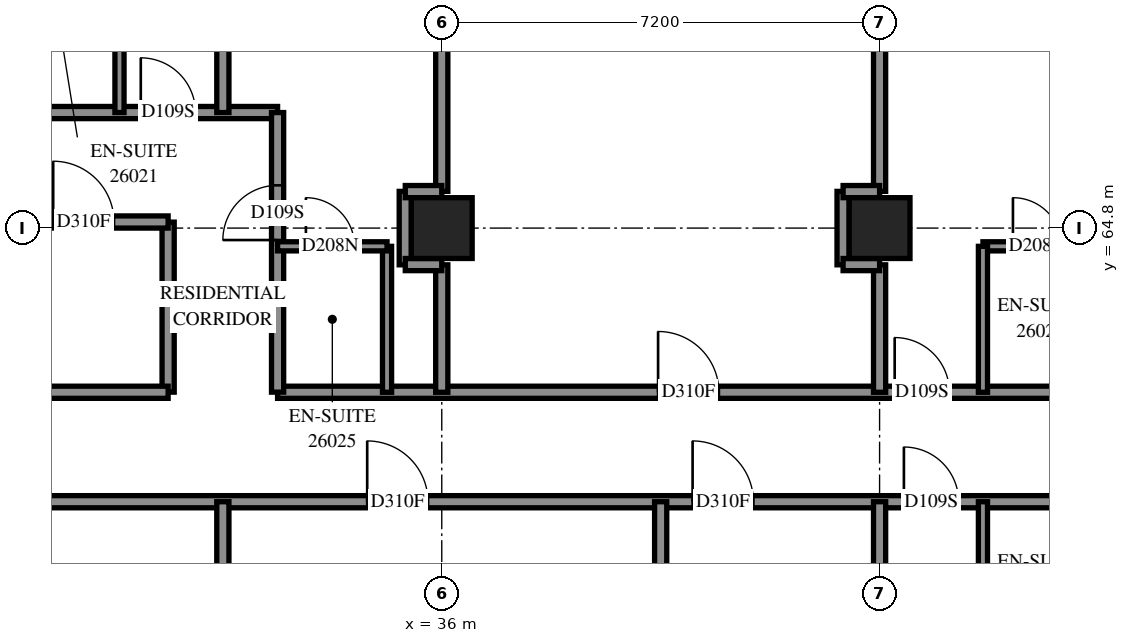
"""IFC4 building model, lengths in metres.
Left out: names, types, materials, properties, quantities, classifications, styles, units other than length and angle.
Written with IfcOpenShell. Run it as: python <this file> out.ifc"""

import sys

from ifc_helpers import new_model, si_unit, direction, frame, frame_2d, origin, origin_2d, place, context, subcontext, project, spatial, rectangle, extrude, element, fill, save


model = new_model("IFC4")
c1 = context("Model", 3, precision=1e-05, world=origin(), true_north=direction((0.0, 1.0)))
c2 = subcontext(c1, "Body", "Model", "MODEL_VIEW")
j1 = project(units=[si_unit("LENGTHUNIT", "METRE"), si_unit("PLANEANGLEUNIT", "RADIAN")], contexts=[c1])
p1 = place(None, origin())
s1 = spatial("IfcSite", under=j1, at=p1, CompositionType="ELEMENT")
p2 = place(p1, origin())
s2 = spatial("IfcBuilding", under=s1, at=p2, CompositionType="ELEMENT")
p3 = place(p2, frame((0.0, 0.0, 98.2)))
s3 = spatial("IfcBuildingStorey", under=s2, at=p3, CompositionType="ELEMENT", Elevation=98.2)
for number, where, z_axis, x_axis in (
    (1, (36.0, 64.8, 0.0), (0.0, 0.0, 1.0), (1.0, 0.0, 0.0)),
    (2, (43.2, 64.8, 0.0), (0.0, 0.0, 1.0), (1.0, 0.0, 0.0)),
):
    element("IfcColumn", number, at=place(p3, frame(where, z_axis=z_axis, x_axis=x_axis)), inside=s3, PredefinedType="COLUMN", context=c2, shape_type="SweptSolid", body=[
        extrude(rectangle(XDim=1.0, YDim=1.0, at=origin_2d()), origin(), (0.0, 0.0, 1.0), 3.1),
    ])
p4 = place(p3, frame((28.802, 60.3, 0.0), z_axis=(0.0, 0.0, 1.0), x_axis=(1.0, 0.0, 0.0)))
e3 = element("IfcWall", 3, at=p4, inside=s3, PredefinedType="PARTITIONING", context=c2, shape_type="SweptSolid", body=[
    extrude(rectangle(XDim=24.298, YDim=0.2, at=frame_2d((12.149, 0.0))), origin(), (0.0, 0.0, 1.0), 3.1),
])
p5 = place(p4, frame((5.972, 0.0, 0.0)))
e4 = element("IfcOpeningElement", 4, at=p5, cuts=e3, PredefinedType="OPENING", context=c2, shape_type="SweptSolid", body=[
    extrude(rectangle(XDim=1.0, YDim=2.1, at=frame_2d((0.5, 1.05))), frame((0.0, 0.11, 0.0), z_axis=(0.0, -1.0, 0.0), x_axis=(1.0, 0.0, 0.0)), (0.0, 0.0, 1.0), 0.22),
])
p6 = place(p4, frame((11.323, 0.0, 0.0)))
e5 = element("IfcOpeningElement", 5, at=p6, cuts=e3, PredefinedType="OPENING", context=c2, shape_type="SweptSolid", body=[
    extrude(rectangle(XDim=1.0, YDim=2.1, at=frame_2d((0.5, 1.05))), frame((0.0, 0.11, 0.0), z_axis=(0.0, -1.0, 0.0), x_axis=(1.0, 0.0, 0.0)), (0.0, 0.0, 1.0), 0.22),
])
p7 = place(p4, frame((14.798, 0.0, 0.0)))
e6 = element("IfcOpeningElement", 6, at=p7, cuts=e3, PredefinedType="OPENING", context=c2, shape_type="SweptSolid", body=[
    extrude(rectangle(XDim=0.9, YDim=2.1, at=frame_2d((0.45, 1.05))), frame((0.0, 0.11, 0.0), z_axis=(0.0, -1.0, 0.0), x_axis=(1.0, 0.0, 0.0)), (0.0, 0.0, 1.0), 0.22),
])
p8 = place(p4, frame((18.833, 0.0, 0.0)))
e7 = element("IfcOpeningElement", 7, at=p8, cuts=e3, PredefinedType="OPENING", context=c2, shape_type="SweptSolid", body=[
    extrude(rectangle(XDim=1.0, YDim=2.1, at=frame_2d((0.5, 1.05))), frame((0.0, 0.11, 0.0), z_axis=(0.0, -1.0, 0.0), x_axis=(1.0, 0.0, 0.0)), (0.0, 0.0, 1.0), 0.22),
])
p9 = place(p4, frame((23.151, 0.0, 0.0)))
e8 = element("IfcOpeningElement", 8, at=p9, cuts=e3, PredefinedType="OPENING", context=c2, shape_type="SweptSolid", body=[
    extrude(rectangle(XDim=1.0, YDim=2.1, at=frame_2d((0.5, 1.05))), frame((0.0, 0.11, 0.0), z_axis=(0.0, -1.0, 0.0), x_axis=(1.0, 0.0, 0.0)), (0.0, 0.0, 1.0), 0.22),
])
p10 = place(p3, frame((33.3, 62.1, 0.0), z_axis=(0.0, 0.0, 1.0), x_axis=(1.0, 0.0, 0.0)))
e9 = element("IfcWall", 9, at=p10, inside=s3, PredefinedType="PARTITIONING", context=c2, shape_type="SweptSolid", body=[
    extrude(rectangle(XDim=17.1, YDim=0.2, at=frame_2d((8.55, 0.0))), origin(), (0.0, 0.0, 1.0), 3.1),
])
p11 = place(p10, frame((6.258, 0.0, 0.0)))
e10 = element("IfcOpeningElement", 10, at=p11, cuts=e9, PredefinedType="OPENING", context=c2, shape_type="SweptSolid", body=[
    extrude(rectangle(XDim=1.0, YDim=2.1, at=frame_2d((0.5, 1.05))), frame((0.0, 0.11, 0.0), z_axis=(0.0, -1.0, 0.0), x_axis=(1.0, 0.0, 0.0)), (0.0, 0.0, 1.0), 0.22),
])
p12 = place(p10, frame((10.148, 0.0, 0.0)))
e11 = element("IfcOpeningElement", 11, at=p12, cuts=e9, PredefinedType="OPENING", context=c2, shape_type="SweptSolid", body=[
    extrude(rectangle(XDim=0.9, YDim=2.1, at=frame_2d((0.45, 1.05))), frame((0.0, 0.11, 0.0), z_axis=(0.0, -1.0, 0.0), x_axis=(1.0, 0.0, 0.0)), (0.0, 0.0, 1.0), 0.22),
])
p13 = place(p10, frame((15.729, 0.0, 0.0)))
e12 = element("IfcOpeningElement", 12, at=p13, cuts=e9, PredefinedType="OPENING", context=c2, shape_type="SweptSolid", body=[
    extrude(rectangle(XDim=0.9, YDim=2.1, at=frame_2d((0.45, 1.05))), frame((0.0, 0.11, 0.0), z_axis=(0.0, -1.0, 0.0), x_axis=(1.0, 0.0, 0.0)), (0.0, 0.0, 1.0), 0.22),
])
p14 = place(p3, frame((21.602, 66.7, 0.0), z_axis=(0.0, 0.0, 1.0), x_axis=(1.0, 0.0, 0.0)))
e13 = element("IfcWall", 13, at=p14, inside=s3, PredefinedType="PARTITIONING", context=c2, shape_type="SweptSolid", body=[
    extrude(rectangle(XDim=11.698, YDim=0.2, at=frame_2d((5.849, 0.0))), origin(), (0.0, 0.0, 1.0), 3.1),
])
p15 = place(p14, frame((1.79, 0.0, 0.0)))
e14 = element("IfcOpeningElement", 14, at=p15, cuts=e13, PredefinedType="OPENING", context=c2, shape_type="SweptSolid", body=[
    extrude(rectangle(XDim=1.0, YDim=2.1, at=frame_2d((0.5, 1.05))), frame((0.0, 0.11, 0.0), z_axis=(0.0, -1.0, 0.0), x_axis=(1.0, 0.0, 0.0)), (0.0, 0.0, 1.0), 0.22),
])
p16 = place(p14, frame((3.998, 0.0, 0.0)))
e15 = element("IfcOpeningElement", 15, at=p16, cuts=e13, PredefinedType="OPENING", context=c2, shape_type="SweptSolid", body=[
    extrude(rectangle(XDim=0.9, YDim=2.1, at=frame_2d((0.45, 1.05))), frame((0.0, 0.11, 0.0), z_axis=(0.0, -1.0, 0.0), x_axis=(1.0, 0.0, 0.0)), (0.0, 0.0, 1.0), 0.22),
])
p17 = place(p14, frame((9.448, 0.0, 0.0)))
e16 = element("IfcOpeningElement", 16, at=p17, cuts=e13, PredefinedType="OPENING", context=c2, shape_type="SweptSolid", body=[
    extrude(rectangle(XDim=0.9, YDim=2.1, at=frame_2d((0.45, 1.05))), frame((0.0, 0.11, 0.0), z_axis=(0.0, -1.0, 0.0), x_axis=(1.0, 0.0, 0.0)), (0.0, 0.0, 1.0), 0.22),
])
p18 = place(p3, frame((32.4, 66.7, 0.0), z_axis=(0.0, 0.0, 1.0), x_axis=(0.0, 1.0, 0.0)))
e17 = element("IfcWall", 17, at=p18, inside=s3, PredefinedType="PARTITIONING", context=c2, shape_type="SweptSolid", body=[
    extrude(rectangle(XDim=6.143, YDim=0.2, at=frame_2d((3.071, 0.0))), origin(), (0.0, 0.0, 1.0), 3.1),
])
for number, where, z_axis, x_axis in (
    (18, (36.0, 65.404, 0.0), (0.0, 0.0, 1.0), (0.0, 1.0, 0.0)),
    (19, (43.2, 65.404, 0.0), (0.0, 0.0, 1.0), (0.0, 1.0, 0.0)),
):
    element("IfcWall", number, at=place(p3, frame(where, z_axis=z_axis, x_axis=x_axis)), inside=s3, PredefinedType="PARTITIONING", context=c2, shape_type="SweptSolid", body=[
        extrude(rectangle(XDim=5.992, YDim=0.2, at=frame_2d((2.996, 0.0))), origin(), (0.0, 0.0, 1.0), 3.1),
    ])
p19 = place(p3, frame((33.3, 62.102, 0.0), z_axis=(0.0, 0.0, 1.0), x_axis=(0.0, 1.0, 0.0)))
e20 = element("IfcWall", 20, at=p19, inside=s3, PredefinedType="PARTITIONING", context=c2, shape_type="SweptSolid", body=[
    extrude(rectangle(XDim=4.598, YDim=0.2, at=frame_2d((2.299, 0.0))), origin(), (0.0, 0.0, 1.0), 3.1),
])
p20 = place(p19, frame((2.501, 0.0, 0.0)))
e21 = element("IfcOpeningElement", 21, at=p20, cuts=e20, PredefinedType="OPENING", context=c2, shape_type="SweptSolid", body=[
    extrude(rectangle(XDim=0.9, YDim=2.1, at=frame_2d((0.45, 1.05))), frame((0.0, 0.11, 0.0), z_axis=(0.0, -1.0, 0.0), x_axis=(1.0, 0.0, 0.0)), (0.0, 0.0, 1.0), 0.22),
])
for number, where, z_axis, x_axis in (
    (22, (32.4, 55.899, 0.0), (0.0, 0.0, 1.0), (0.0, 1.0, 0.0)),
    (23, (39.6, 55.899, 0.0), (0.0, 0.0, 1.0), (0.0, 1.0, 0.0)),
):
    element("IfcWall", number, at=place(p3, frame(where, z_axis=z_axis, x_axis=x_axis)), inside=s3, PredefinedType="PARTITIONING", context=c2, shape_type="SweptSolid", body=[
        extrude(rectangle(XDim=4.401, YDim=0.2, at=frame_2d((2.2, 0.0))), origin(), (0.0, 0.0, 1.0), 3.1),
    ])
p21 = place(p3, frame((44.9, 64.5, 0.0), z_axis=(0.0, 0.0, 1.0), x_axis=(1.0, 0.0, 0.0)))
e24 = element("IfcWall", 24, at=p21, inside=s3, PredefinedType="PARTITIONING", context=c2, shape_type="SweptSolid", body=[
    extrude(rectangle(XDim=3.8, YDim=0.15, at=frame_2d((1.9, 0.0))), origin(), (0.0, 0.0, 1.0), 3.1),
])
p22 = place(p21, frame((0.493, 0.0, 0.0)))
e25 = element("IfcOpeningElement", 25, at=p22, cuts=e24, PredefinedType="OPENING", context=c2, shape_type="SweptSolid", body=[
    extrude(rectangle(XDim=0.8, YDim=2.1, at=frame_2d((0.4, 1.05))), frame((0.0, 0.085, 0.0), z_axis=(0.0, -1.0, 0.0), x_axis=(1.0, 0.0, 0.0)), (0.0, 0.0, 1.0), 0.17),
])
p23 = place(p21, frame((2.507, 0.0, 0.0)))
e26 = element("IfcOpeningElement", 26, at=p23, cuts=e24, PredefinedType="OPENING", context=c2, shape_type="SweptSolid", body=[
    extrude(rectangle(XDim=0.8, YDim=2.1, at=frame_2d((0.4, 1.05))), frame((0.0, 0.085, 0.0), z_axis=(0.0, -1.0, 0.0), x_axis=(1.0, 0.0, 0.0)), (0.0, 0.0, 1.0), 0.17),
])
p24 = place(p3, frame((31.5, 62.102, 0.0), z_axis=(0.0, 0.0, 1.0), x_axis=(0.0, 1.0, 0.0)))
e27 = element("IfcWall", 27, at=p24, inside=s3, PredefinedType="PARTITIONING", context=c2, shape_type="SweptSolid", body=[
    extrude(rectangle(XDim=2.796, YDim=0.2, at=frame_2d((1.398, 0.0))), origin(), (0.0, 0.0, 1.0), 3.1),
])
p25 = place(p3, frame((28.802, 62.1, 0.0), z_axis=(0.0, 0.0, 1.0), x_axis=(1.0, 0.0, 0.0)))
e28 = element("IfcWall", 28, at=p25, inside=s3, PredefinedType="PARTITIONING", context=c2, shape_type="SweptSolid", body=[
    extrude(rectangle(XDim=2.698, YDim=0.2, at=frame_2d((1.349, 0.0))), origin(), (0.0, 0.0, 1.0), 3.1),
])
for number, where, z_axis, x_axis in (
    (29, (35.1, 62.1, 0.0), (0.0, 0.0, 1.0), (0.0, 1.0, 0.0)),
    (30, (44.9, 57.9, 0.0), (0.0, 0.0, 1.0), (0.0, 1.0, 0.0)),
    (31, (44.9, 62.1, 0.0), (0.0, 0.0, 1.0), (0.0, 1.0, 0.0)),
    (32, (30.7, 66.7, 0.0), (0.0, 0.0, 1.0), (0.0, 1.0, 0.0)),
):
    element("IfcWall", number, at=place(p3, frame(where, z_axis=z_axis, x_axis=x_axis)), inside=s3, PredefinedType="PARTITIONING", context=c2, shape_type="SweptSolid", body=[
        extrude(rectangle(XDim=2.4, YDim=0.15, at=frame_2d((1.2, 0.0))), origin(), (0.0, 0.0, 1.0), 3.1),
    ])
p26 = place(p3, frame((29.3, 64.9, 0.0), z_axis=(0.0, 0.0, 1.0), x_axis=(1.0, 0.0, 0.0)))
e33 = element("IfcWall", 33, at=p26, inside=s3, PredefinedType="PARTITIONING", context=c2, shape_type="SweptSolid", body=[
    extrude(rectangle(XDim=2.2, YDim=0.2, at=frame_2d((1.1, 0.0))), origin(), (0.0, 0.0, 1.0), 3.1),
])
p27 = place(p26, frame((0.31, 0.0, 0.0)))
e34 = element("IfcOpeningElement", 34, at=p27, cuts=e33, PredefinedType="OPENING", context=c2, shape_type="SweptSolid", body=[
    extrude(rectangle(XDim=1.0, YDim=2.1, at=frame_2d((0.5, 1.05))), frame((0.0, 0.11, 0.0), z_axis=(0.0, -1.0, 0.0), x_axis=(1.0, 0.0, 0.0)), (0.0, 0.0, 1.0), 0.22),
])
p28 = place(p3, frame((43.2, 58.1, 0.0), z_axis=(0.0, 0.0, 1.0), x_axis=(0.0, 1.0, 0.0)))
e35 = element("IfcWall", 35, at=p28, inside=s3, PredefinedType="PARTITIONING", context=c2, shape_type="SweptSolid", body=[
    extrude(rectangle(XDim=2.2, YDim=0.2, at=frame_2d((1.1, 0.0))), origin(), (0.0, 0.0, 1.0), 3.1),
])
for number, where, z_axis, x_axis in (
    (36, (36.0, 62.1, 0.0), (0.0, 0.0, 1.0), (0.0, 1.0, 0.0)),
    (37, (43.2, 62.1, 0.0), (0.0, 0.0, 1.0), (0.0, 1.0, 0.0)),
):
    element("IfcWall", number, at=place(p3, frame(where, z_axis=z_axis, x_axis=x_axis)), inside=s3, PredefinedType="PARTITIONING", context=c2, shape_type="SweptSolid", body=[
        extrude(rectangle(XDim=2.096, YDim=0.2, at=frame_2d((1.048, 0.0))), origin(), (0.0, 0.0, 1.0), 3.1),
    ])
p29 = place(p3, frame((33.3, 64.5, 0.0), z_axis=(0.0, 0.0, 1.0), x_axis=(1.0, 0.0, 0.0)))
e38 = element("IfcWall", 38, at=p29, inside=s3, PredefinedType="PARTITIONING", context=c2, shape_type="SweptSolid", body=[
    extrude(rectangle(XDim=1.8, YDim=0.15, at=frame_2d((0.9, 0.0))), origin(), (0.0, 0.0, 1.0), 3.1),
])
p30 = place(p29, frame((0.466, 0.0, 0.0)))
e39 = element("IfcOpeningElement", 39, at=p30, cuts=e38, PredefinedType="OPENING", context=c2, shape_type="SweptSolid", body=[
    extrude(rectangle(XDim=0.8, YDim=2.1, at=frame_2d((0.4, 1.05))), frame((0.0, 0.085, 0.0), z_axis=(0.0, -1.0, 0.0), x_axis=(1.0, 0.0, 0.0)), (0.0, 0.0, 1.0), 0.17),
])
for number, where, z_axis, x_axis in (
    (40, (35.4, 64.196, 0.0), (0.0, 0.0, 1.0), (0.0, 1.0, 0.0)),
    (41, (42.6, 64.196, 0.0), (0.0, 0.0, 1.0), (0.0, 1.0, 0.0)),
):
    element("IfcWall", number, at=place(p3, frame(where, z_axis=z_axis, x_axis=x_axis)), inside=s3, PredefinedType="PARTITIONING", context=c2, shape_type="SweptSolid", body=[
        extrude(rectangle(XDim=1.208, YDim=0.2, at=frame_2d((0.604, 0.0))), origin(), (0.0, 0.0, 1.0), 3.1),
    ])
for number, where, z_axis, x_axis in (
    (42, (35.4, 65.4, 0.0), (0.0, 0.0, 1.0), (1.0, 0.0, 0.0)),
    (43, (42.6, 65.4, 0.0), (0.0, 0.0, 1.0), (1.0, 0.0, 0.0)),
    (44, (35.4, 64.2, 0.0), (0.0, 0.0, 1.0), (1.0, 0.0, 0.0)),
    (45, (42.6, 64.2, 0.0), (0.0, 0.0, 1.0), (1.0, 0.0, 0.0)),
):
    element("IfcWall", number, at=place(p3, frame(where, z_axis=z_axis, x_axis=x_axis)), inside=s3, PredefinedType="PARTITIONING", context=c2, shape_type="SweptSolid", body=[
        extrude(rectangle(XDim=0.6, YDim=0.2, at=frame_2d((0.3, 0.0))), origin(), (0.0, 0.0, 1.0), 3.1),
    ])
p31 = place(p17, origin())
e46 = element("IfcDoor", 46, at=p31, inside=s3, OperationType="SINGLE_SWING_RIGHT", PredefinedType="DOOR", context=c2, shape_type="SweptSolid", body=[
    extrude(rectangle(XDim=0.9, YDim=2.1, at=frame_2d((0.45, 1.05))), frame((0.0, 0.025, 0.0), z_axis=(0.0, -1.0, 0.0), x_axis=(1.0, 0.0, 0.0)), (0.0, 0.0, 1.0), 0.05),
])
fill(e16, e46)
p32 = place(p27, origin())
e47 = element("IfcDoor", 47, at=p32, inside=s3, OperationType="SINGLE_SWING_RIGHT", PredefinedType="DOOR", context=c2, shape_type="SweptSolid", body=[
    extrude(rectangle(XDim=1.0, YDim=2.1, at=frame_2d((0.5, 1.05))), frame((0.0, 0.025, 0.0), z_axis=(0.0, -1.0, 0.0), x_axis=(1.0, 0.0, 0.0)), (0.0, 0.0, 1.0), 0.05),
])
fill(e34, e47)
p33 = place(p5, origin())
e48 = element("IfcDoor", 48, at=p33, inside=s3, OperationType="SINGLE_SWING_RIGHT", PredefinedType="DOOR", context=c2, shape_type="SweptSolid", body=[
    extrude(rectangle(XDim=1.0, YDim=2.1, at=frame_2d((0.5, 1.05))), frame((0.0, 0.025, 0.0), z_axis=(0.0, -1.0, 0.0), x_axis=(1.0, 0.0, 0.0)), (0.0, 0.0, 1.0), 0.05),
])
fill(e4, e48)
p34 = place(p20, origin())
e49 = element("IfcDoor", 49, at=p34, inside=s3, OperationType="SINGLE_SWING_LEFT", PredefinedType="DOOR", context=c2, shape_type="SweptSolid", body=[
    extrude(rectangle(XDim=0.9, YDim=2.1, at=frame_2d((0.45, 1.05))), frame((0.0, 0.025, 0.0), z_axis=(0.0, -1.0, 0.0), x_axis=(1.0, 0.0, 0.0)), (0.0, 0.0, 1.0), 0.05),
])
fill(e21, e49)
p35 = place(p30, origin())
e50 = element("IfcDoor", 50, at=p35, inside=s3, OperationType="SINGLE_SWING_RIGHT", PredefinedType="DOOR", context=c2, shape_type="SweptSolid", body=[
    extrude(rectangle(XDim=0.8, YDim=2.1, at=frame_2d((0.4, 1.05))), frame((0.0, 0.025, 0.0), z_axis=(0.0, -1.0, 0.0), x_axis=(1.0, 0.0, 0.0)), (0.0, 0.0, 1.0), 0.05),
])
fill(e39, e50)
p36 = place(p11, origin())
e51 = element("IfcDoor", 51, at=p36, inside=s3, OperationType="SINGLE_SWING_RIGHT", PredefinedType="DOOR", context=c2, shape_type="SweptSolid", body=[
    extrude(rectangle(XDim=1.0, YDim=2.1, at=frame_2d((0.5, 1.05))), frame((0.0, 0.025, 0.0), z_axis=(0.0, -1.0, 0.0), x_axis=(1.0, 0.0, 0.0)), (0.0, 0.0, 1.0), 0.05),
])
fill(e10, e51)
p37 = place(p12, origin())
e52 = element("IfcDoor", 52, at=p37, inside=s3, OperationType="SINGLE_SWING_RIGHT", PredefinedType="DOOR", context=c2, shape_type="SweptSolid", body=[
    extrude(rectangle(XDim=0.9, YDim=2.1, at=frame_2d((0.45, 1.05))), frame((0.0, 0.025, 0.0), z_axis=(0.0, -1.0, 0.0), x_axis=(1.0, 0.0, 0.0)), (0.0, 0.0, 1.0), 0.05),
])
fill(e11, e52)
p38 = place(p22, origin())
e53 = element("IfcDoor", 53, at=p38, inside=s3, OperationType="SINGLE_SWING_RIGHT", PredefinedType="DOOR", context=c2, shape_type="SweptSolid", body=[
    extrude(rectangle(XDim=0.8, YDim=2.1, at=frame_2d((0.4, 1.05))), frame((0.0, 0.025, 0.0), z_axis=(0.0, -1.0, 0.0), x_axis=(1.0, 0.0, 0.0)), (0.0, 0.0, 1.0), 0.05),
])
fill(e25, e53)
p39 = place(p6, origin())
e54 = element("IfcDoor", 54, at=p39, inside=s3, OperationType="SINGLE_SWING_RIGHT", PredefinedType="DOOR", context=c2, shape_type="SweptSolid", body=[
    extrude(rectangle(XDim=1.0, YDim=2.1, at=frame_2d((0.5, 1.05))), frame((0.0, 0.025, 0.0), z_axis=(0.0, -1.0, 0.0), x_axis=(1.0, 0.0, 0.0)), (0.0, 0.0, 1.0), 0.05),
])
fill(e5, e54)
p40 = place(p7, origin())
e55 = element("IfcDoor", 55, at=p40, inside=s3, OperationType="SINGLE_SWING_LEFT", PredefinedType="DOOR", context=c2, shape_type="SweptSolid", body=[
    extrude(rectangle(XDim=0.9, YDim=2.1, at=frame_2d((0.45, 1.05))), frame((0.0, 0.025, 0.0), z_axis=(0.0, -1.0, 0.0), x_axis=(1.0, 0.0, 0.0)), (0.0, 0.0, 1.0), 0.05),
])
fill(e6, e55)
save(model, sys.argv[1])
